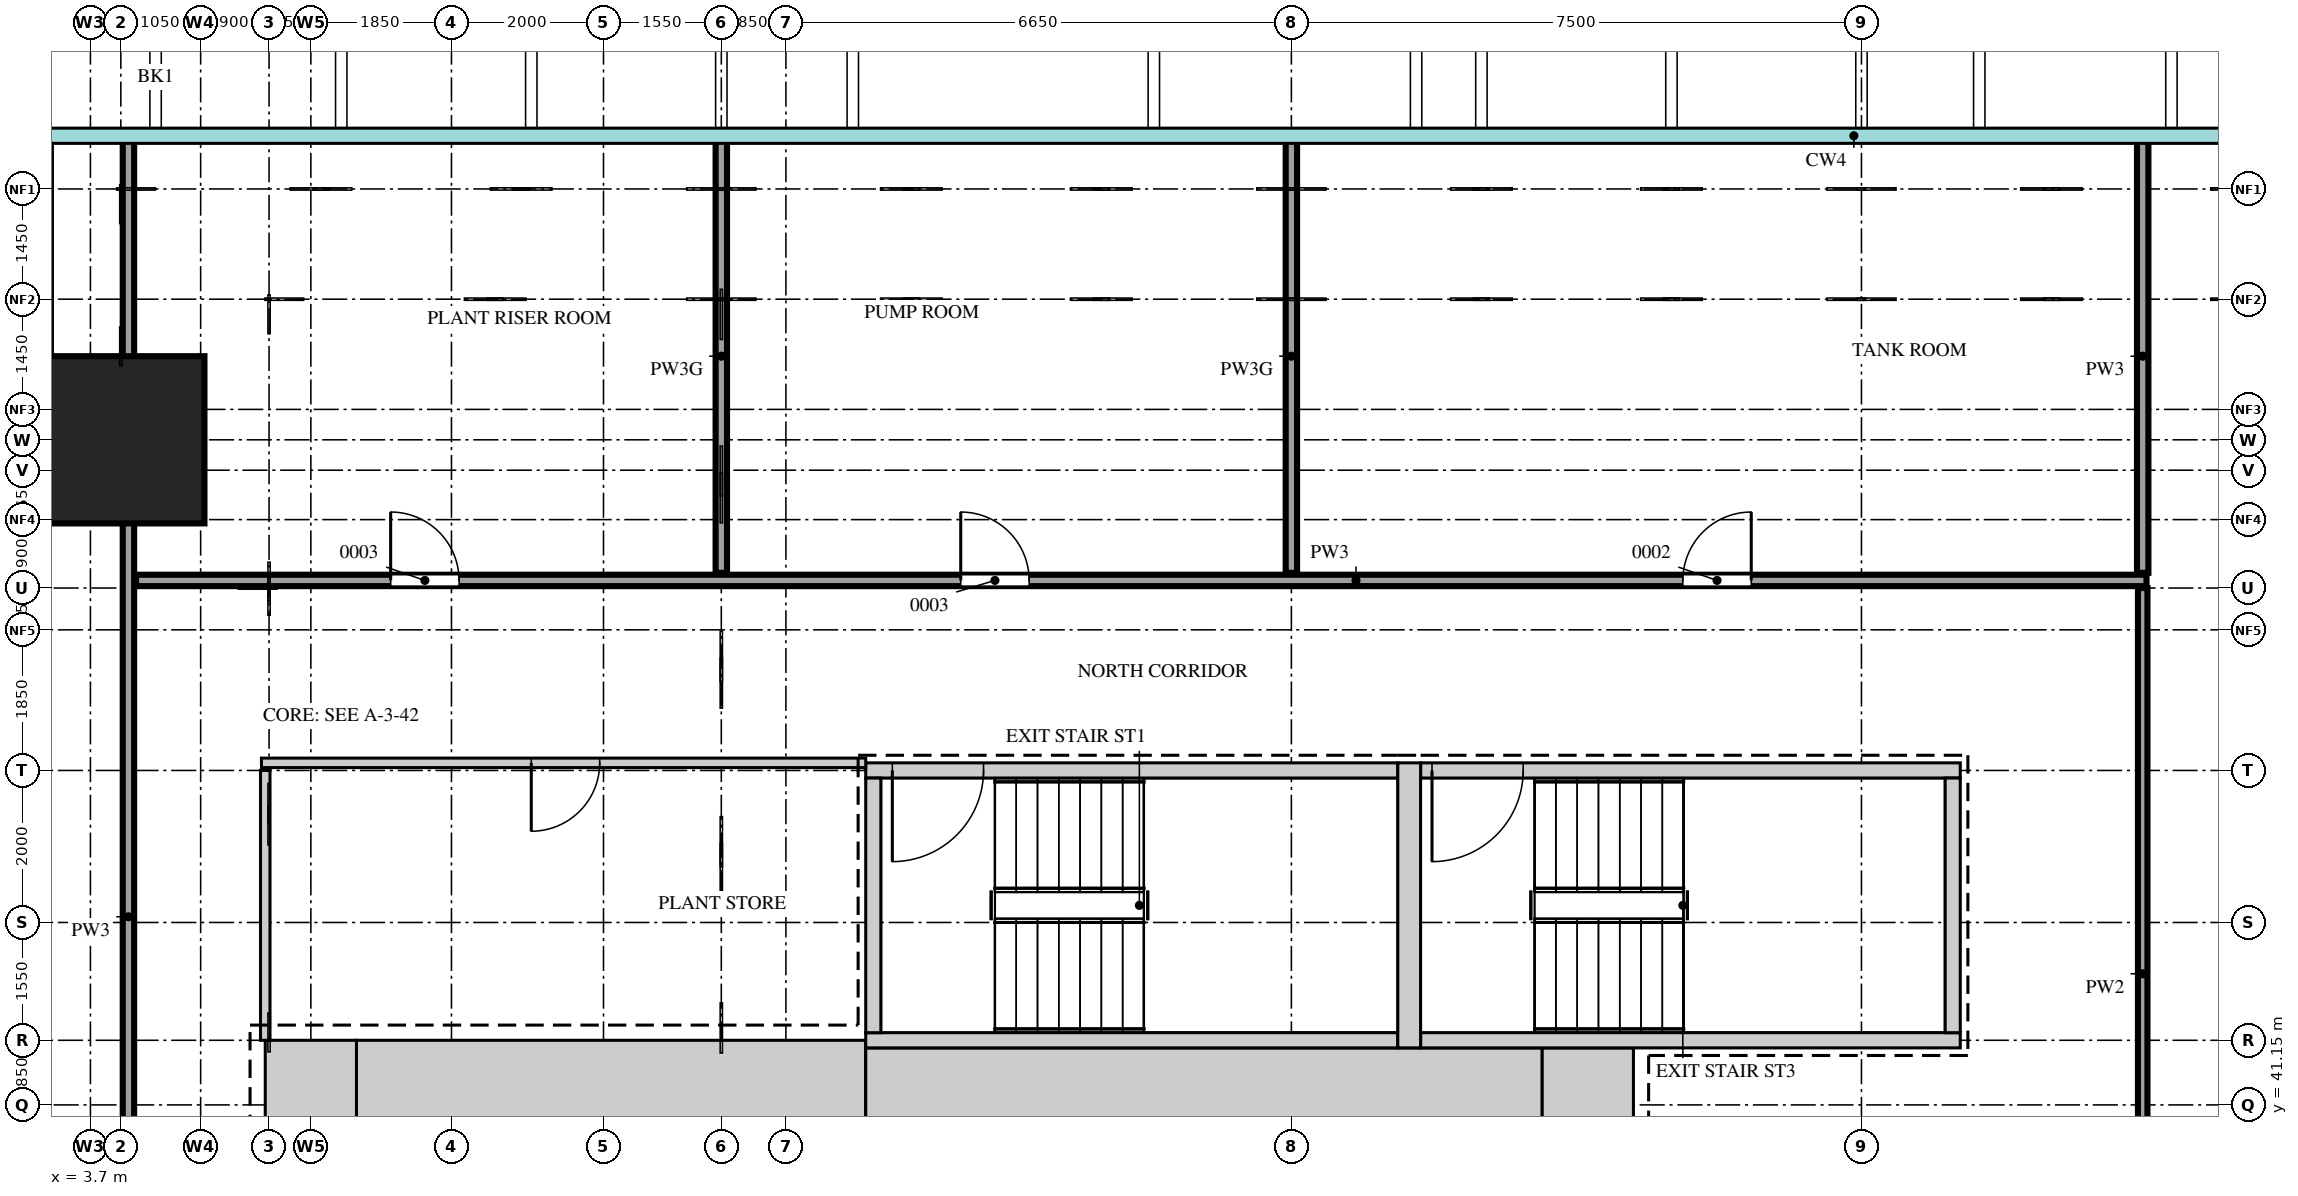
"""IFC4 building model, lengths in metres.
Left out: names, types, materials, properties, quantities, classifications, styles, units other than length and angle.
Written with IfcOpenShell. Run it as: python <this file> out.ifc"""

import sys

from ifc_helpers import new_model, si_unit, direction, frame, frame_2d, origin, origin_2d, place, context, subcontext, project, spatial, rectangle, extrude, source, transform, mapped, element, fill, save


model = new_model("IFC4")
c1 = context("Model", 3, precision=1e-05, world=origin(), true_north=direction((0.0, 1.0)))
c2 = subcontext(c1, "Body", "Model", "MODEL_VIEW")
j1 = project(units=[si_unit("LENGTHUNIT", "METRE"), si_unit("PLANEANGLEUNIT", "RADIAN")], contexts=[c1])
p1 = place(None, origin())
s1 = spatial("IfcSite", under=j1, at=p1, CompositionType="ELEMENT")
p2 = place(p1, origin())
s2 = spatial("IfcBuilding", under=s1, at=p2, CompositionType="ELEMENT")
p3 = place(p2, frame((0.0, 0.0, 96.0)))
s3 = spatial("IfcBuildingStorey", under=s2, at=p3, CompositionType="ELEMENT", Elevation=96.0)
m1 = source(origin(), c2, "Body", "SweptSolid", [
    extrude(rectangle(XDim=6.7, YDim=1.2, at=frame_2d((3.35, 0.0))), origin(), (0.0, 0.0, 1.0), 5.2),
])
p4 = place(p3, frame((7.2, 41.4, 0.0), z_axis=(0.0, 0.0, 1.0), x_axis=(1.0, 0.0, 0.0)))
e1 = element("IfcWall", 1, at=p4, inside=s3, PredefinedType="SHEAR", context=c2, shape_type="MappedRepresentation", body=[
    mapped(m1, transform((0.0, 0.0, 0.0))),
])
m2 = source(origin(), c2, "Body", "SweptSolid", [
    extrude(rectangle(XDim=8.9, YDim=1.1, at=frame_2d((4.45, 0.0))), origin(), (0.0, 0.0, 1.0), 5.2),
])
p5 = place(p3, frame((13.9, 41.35, 0.0), z_axis=(0.0, 0.0, 1.0), x_axis=(1.0, 0.0, 0.0)))
e2 = element("IfcWall", 2, at=p5, inside=s3, PredefinedType="SHEAR", context=c2, shape_type="MappedRepresentation", body=[
    mapped(m2, transform((0.0, 0.0, 0.0))),
])
m3 = source(origin(), c2, "Body", "SweptSolid", [
    extrude(rectangle(XDim=1.2, YDim=1.1, at=frame_2d((0.6, 0.0))), origin(), (0.0, 0.0, 1.0), 5.2),
])
p6 = place(p3, frame((22.8, 41.35, 0.0), z_axis=(0.0, 0.0, 1.0), x_axis=(1.0, 0.0, 0.0)))
e3 = element("IfcWall", 3, at=p6, inside=s3, PredefinedType="SHEAR", context=c2, shape_type="MappedRepresentation", body=[
    mapped(m3, transform((0.0, 0.0, 0.0))),
])
m4 = source(origin(), c2, "Body", "SweptSolid", [
    extrude(rectangle(XDim=1.2, YDim=1.2, at=frame_2d((0.6, 0.0))), origin(), (0.0, 0.0, 1.0), 5.2),
])
p7 = place(p3, frame((6.0, 41.4, 0.0), z_axis=(0.0, 0.0, 1.0), x_axis=(1.0, 0.0, 0.0)))
e4 = element("IfcWall", 4, at=p7, inside=s3, PredefinedType="SHEAR", context=c2, shape_type="MappedRepresentation", body=[
    mapped(m4, transform((0.0, 0.0, 0.0))),
])
m5 = source(origin(), c2, "Body", "SweptSolid", [
    extrude(rectangle(XDim=7.0, YDim=0.2, at=frame_2d((3.5, 0.0))), origin(), (0.0, 0.0, 1.0), 5.2),
])
p8 = place(p3, frame((13.9, 45.55, 0.0), z_axis=(0.0, 0.0, 1.0), x_axis=(1.0, 0.0, 0.0)))
e5 = element("IfcWall", 5, at=p8, inside=s3, PredefinedType="SHEAR", context=c2, shape_type="MappedRepresentation", body=[
    mapped(m5, transform((0.0, 0.0, 0.0))),
])
m6 = source(origin(), c2, "Body", "SweptSolid", [
    extrude(rectangle(XDim=1.2, YDim=2.1, at=frame_2d((0.6, 1.05))), frame((0.0, 0.11, 0.0), z_axis=(0.0, -1.0, 0.0), x_axis=(1.0, 0.0, 0.0)), (0.0, 0.0, 1.0), 0.22),
])
p9 = place(p8, frame((0.35, 0.0, 0.0)))
e6 = element("IfcOpeningElement", 6, at=p9, cuts=e5, PredefinedType="OPENING", context=c2, shape_type="MappedRepresentation", body=[
    mapped(m6, transform((0.0, 0.0, 0.0))),
])
p10 = place(p3, frame((13.9, 42.0, 0.0), z_axis=(0.0, 0.0, 1.0), x_axis=(1.0, 0.0, 0.0)))
e7 = element("IfcWall", 7, at=p10, inside=s3, PredefinedType="SHEAR", context=c2, shape_type="MappedRepresentation", body=[
    mapped(m5, transform((0.0, 0.0, 0.0))),
])
m7 = source(origin(), c2, "Body", "SweptSolid", [
    extrude(rectangle(XDim=7.1, YDim=0.2, at=frame_2d((3.55, 0.0))), origin(), (0.0, 0.0, 1.0), 5.2),
])
p11 = place(p3, frame((21.2, 45.55, 0.0), z_axis=(0.0, 0.0, 1.0), x_axis=(1.0, 0.0, 0.0)))
e8 = element("IfcWall", 8, at=p11, inside=s3, PredefinedType="SHEAR", context=c2, shape_type="MappedRepresentation", body=[
    mapped(m7, transform((0.0, 0.0, 0.0))),
])
p12 = place(p11, frame((0.15, 0.0, 0.0)))
e9 = element("IfcOpeningElement", 9, at=p12, cuts=e8, PredefinedType="OPENING", context=c2, shape_type="MappedRepresentation", body=[
    mapped(m6, transform((0.0, 0.0, 0.0))),
])
p13 = place(p3, frame((21.2, 42.0, 0.0), z_axis=(0.0, 0.0, 1.0), x_axis=(1.0, 0.0, 0.0)))
e10 = element("IfcWall", 10, at=p13, inside=s3, PredefinedType="SHEAR", context=c2, shape_type="MappedRepresentation", body=[
    mapped(m7, transform((0.0, 0.0, 0.0))),
])
m8 = source(origin(), c2, "Body", "SweptSolid", [
    extrude(rectangle(XDim=3.75, YDim=0.3, at=frame_2d((1.875, 0.0))), origin(), (0.0, 0.0, 1.0), 5.2),
])
p14 = place(p3, frame((21.05, 41.9, 0.0), z_axis=(0.0, 0.0, 1.0), x_axis=(0.0, 1.0, 0.0)))
e11 = element("IfcWall", 11, at=p14, inside=s3, PredefinedType="SHEAR", context=c2, shape_type="MappedRepresentation", body=[
    mapped(m8, transform((0.0, 0.0, 0.0))),
])
m9 = source(origin(), c2, "Body", "SweptSolid", [
    extrude(rectangle(XDim=3.35, YDim=0.2, at=frame_2d((1.675, 0.0))), origin(), (0.0, 0.0, 1.0), 5.2),
])
for number, where, z_axis, x_axis in (
    (12, (14.0, 42.1, 0.0), (0.0, 0.0, 1.0), (0.0, 1.0, 0.0)),
    (13, (28.2, 42.1, 0.0), (0.0, 0.0, 1.0), (0.0, 1.0, 0.0)),
):
    element("IfcWall", number, at=place(p3, frame(where, z_axis=z_axis, x_axis=x_axis)), inside=s3, PredefinedType="SHEAR", context=c2, shape_type="MappedRepresentation", body=[
        mapped(m9, transform((0.0, 0.0, 0.0))),
    ])
m10 = source(origin(), c2, "Body", "SweptSolid", [
    extrude(rectangle(XDim=2.2, YDim=2.2, at=origin_2d()), origin(), (0.0, 0.0, 1.0), 5.5),
])
p15 = place(p3, frame((4.1, 49.9, 0.0), z_axis=(0.0, 0.0, 1.0), x_axis=(1.0, 0.0, 0.0)))
e14 = element("IfcColumn", 14, at=p15, inside=s3, PredefinedType="COLUMN", context=c2, shape_type="MappedRepresentation", body=[
    mapped(m10, transform((0.0, 0.0, 0.0))),
])
m11 = source(origin(), c2, "Body", "SweptSolid", [
    extrude(rectangle(XDim=53.7, YDim=0.15, at=frame_2d((26.85, 0.0))), origin(), (0.0, 0.0, 1.0), 5.2),
])
p16 = place(p3, frame((4.2, 0.15, 0.0), z_axis=(0.0, 0.0, 1.0), x_axis=(0.0, 1.0, 0.0)))
e15 = element("IfcWall", 15, at=p16, inside=s3, PredefinedType="PARTITIONING", context=c2, shape_type="MappedRepresentation", body=[
    mapped(m11, transform((0.0, 0.0, 0.0))),
])
m12 = source(origin(), c2, "Body", "SweptSolid", [
    extrude(rectangle(XDim=0.9, YDim=2.1, at=frame_2d((0.45, 1.05))), frame((0.0, 0.085, 0.0), z_axis=(0.0, -1.0, 0.0), x_axis=(1.0, 0.0, 0.0)), (0.0, 0.0, 1.0), 0.17),
])
p17 = place(p16, frame((13.45, 0.0, 0.0)))
e16 = element("IfcOpeningElement", 16, at=p17, cuts=e15, PredefinedType="OPENING", context=c2, shape_type="MappedRepresentation", body=[
    mapped(m12, transform((0.0, 0.0, 0.0))),
])
m13 = source(origin(), c2, "Body", "SweptSolid", [
    extrude(rectangle(XDim=1.2, YDim=2.1, at=frame_2d((0.6, 1.05))), frame((0.0, 0.085, 0.0), z_axis=(0.0, -1.0, 0.0), x_axis=(1.0, 0.0, 0.0)), (0.0, 0.0, 1.0), 0.17),
])
p18 = place(p16, frame((32.05, 0.0, 0.0)))
e17 = element("IfcOpeningElement", 17, at=p18, cuts=e15, PredefinedType="OPENING", context=c2, shape_type="MappedRepresentation", body=[
    mapped(m13, transform((0.0, 0.0, 0.0))),
])
m14 = source(origin(), c2, "Body", "SweptSolid", [
    extrude(rectangle(XDim=10.15, YDim=0.125, at=frame_2d((5.075, 0.0))), origin(), (0.0, 0.0, 1.0), 5.2),
])
p19 = place(p3, frame((30.7, 37.8, 0.0), z_axis=(0.0, 0.0, 1.0), x_axis=(0.0, 1.0, 0.0)))
e18 = element("IfcWall", 18, at=p19, inside=s3, PredefinedType="PARTITIONING", context=c2, shape_type="MappedRepresentation", body=[
    mapped(m14, transform((0.0, 0.0, 0.0))),
])
m15 = source(origin(), c2, "Body", "SweptSolid", [
    extrude(rectangle(XDim=3.55, YDim=0.125, at=frame_2d((1.775, 0.0))), origin(), (0.0, 0.0, 1.0), 5.2),
])
p20 = place(p3, frame((6.0, 42.0, 0.0), z_axis=(0.0, 0.0, 1.0), x_axis=(0.0, 1.0, 0.0)))
e19 = element("IfcWall", 19, at=p20, inside=s3, PredefinedType="PARTITIONING", context=c2, shape_type="MappedRepresentation", body=[
    mapped(m15, transform((0.0, 0.0, 0.0))),
])
m16 = source(origin(), c2, "Body", "SweptSolid", [
    extrude(rectangle(XDim=7.95, YDim=0.125, at=frame_2d((3.975, 0.0))), origin(), (0.0, 0.0, 1.0), 5.2),
])
p21 = place(p3, frame((5.95, 45.65, 0.0), z_axis=(0.0, 0.0, 1.0), x_axis=(1.0, 0.0, 0.0)))
e20 = element("IfcWall", 20, at=p21, inside=s3, PredefinedType="PARTITIONING", context=c2, shape_type="MappedRepresentation", body=[
    mapped(m16, transform((0.0, 0.0, 0.0))),
])
m17 = source(origin(), c2, "Body", "SweptSolid", [
    extrude(rectangle(XDim=0.9, YDim=2.1, at=frame_2d((0.45, 1.05))), frame((0.0, 0.073, 0.0), z_axis=(0.0, -1.0, 0.0), x_axis=(1.0, 0.0, 0.0)), (0.0, 0.0, 1.0), 0.145),
])
p22 = place(p21, frame((3.55, 0.0, 0.0)))
e21 = element("IfcOpeningElement", 21, at=p22, cuts=e20, PredefinedType="OPENING", context=c2, shape_type="MappedRepresentation", body=[
    mapped(m17, transform((0.0, 0.0, 0.0))),
])
m18 = source(origin(), c2, "Body", "SweptSolid", [
    extrude(rectangle(XDim=26.45, YDim=0.15, at=frame_2d((13.225, 0.0))), origin(), (0.0, 0.0, 1.0), 5.2),
])
p23 = place(p3, frame((4.3, 48.05, 0.0), z_axis=(0.0, 0.0, 1.0), x_axis=(1.0, 0.0, 0.0)))
e22 = element("IfcWall", 22, at=p23, inside=s3, PredefinedType="PARTITIONING", context=c2, shape_type="MappedRepresentation", body=[
    mapped(m18, transform((0.0, 0.0, 0.0))),
])
p24 = place(p23, frame((3.35, 0.0, 0.0)))
e23 = element("IfcOpeningElement", 23, at=p24, cuts=e22, PredefinedType="OPENING", context=c2, shape_type="MappedRepresentation", body=[
    mapped(m12, transform((0.0, 0.0, 0.0))),
])
p25 = place(p23, frame((10.85, 0.0, 0.0)))
e24 = element("IfcOpeningElement", 24, at=p25, cuts=e22, PredefinedType="OPENING", context=c2, shape_type="MappedRepresentation", body=[
    mapped(m12, transform((0.0, 0.0, 0.0))),
])
p26 = place(p23, frame((20.35, 0.0, 0.0)))
e25 = element("IfcOpeningElement", 25, at=p26, cuts=e22, PredefinedType="OPENING", context=c2, shape_type="MappedRepresentation", body=[
    mapped(m12, transform((0.0, 0.0, 0.0))),
])
m19 = source(origin(), c2, "Body", "SweptSolid", [
    extrude(rectangle(XDim=5.7, YDim=0.15, at=frame_2d((2.85, 0.0))), origin(), (0.0, 0.0, 1.0), 2.35),
])
for number, where, z_axis, x_axis in (
    (26, (12.0, 48.15, 0.0), (0.0, 0.0, 1.0), (0.0, 1.0, 0.0)),
    (27, (19.5, 48.15, 0.0), (0.0, 0.0, 1.0), (0.0, 1.0, 0.0)),
):
    element("IfcWall", number, at=place(p3, frame(where, z_axis=z_axis, x_axis=x_axis)), inside=s3, PredefinedType="PARTITIONING", context=c2, shape_type="MappedRepresentation", body=[
        mapped(m19, transform((0.0, 0.0, 0.0))),
    ])
m20 = source(origin(), c2, "Body", "SweptSolid", [
    extrude(rectangle(XDim=5.7, YDim=0.15, at=frame_2d((2.85, 0.0))), origin(), (0.0, 0.0, 1.0), 5.2),
])
p27 = place(p3, frame((30.7, 48.15, 0.0), z_axis=(0.0, 0.0, 1.0), x_axis=(0.0, 1.0, 0.0)))
e28 = element("IfcWall", 28, at=p27, inside=s3, PredefinedType="PARTITIONING", context=c2, shape_type="MappedRepresentation", body=[
    mapped(m20, transform((0.0, 0.0, 0.0))),
])
m21 = source(origin(), c2, "Body", "SweptSolid", [
    extrude(rectangle(XDim=0.9, YDim=2.1, at=frame_2d((0.45, 1.05))), frame((0.0, 0.025, 0.0), z_axis=(0.0, -1.0, 0.0), x_axis=(1.0, 0.0, 0.0)), (0.0, 0.0, 1.0), 0.05),
])
p28 = place(p24, origin())
e29 = element("IfcDoor", 29, at=p28, inside=s3, OperationType="SINGLE_SWING_RIGHT", PredefinedType="DOOR", context=c2, shape_type="MappedRepresentation", body=[
    mapped(m21, transform((0.0, 0.0, 0.0))),
])
fill(e23, e29)
p29 = place(p25, origin())
e30 = element("IfcDoor", 30, at=p29, inside=s3, OperationType="SINGLE_SWING_RIGHT", PredefinedType="DOOR", context=c2, shape_type="MappedRepresentation", body=[
    mapped(m21, transform((0.0, 0.0, 0.0))),
])
fill(e24, e30)
p30 = place(p26, origin())
e31 = element("IfcDoor", 31, at=p30, inside=s3, OperationType="SINGLE_SWING_LEFT", PredefinedType="DOOR", context=c2, shape_type="MappedRepresentation", body=[
    mapped(m21, transform((0.0, 0.0, 0.0))),
])
fill(e25, e31)
p31 = place(p22, origin())
e32 = element("IfcDoor", 32, at=p31, inside=s3, OperationType="SINGLE_SWING_LEFT", PredefinedType="DOOR", context=c2, shape_type="MappedRepresentation", body=[
    mapped(m21, transform((0.0, 0.0, 0.0))),
])
fill(e21, e32)
m22 = source(origin(), c2, "Body", "SweptSolid", [
    extrude(rectangle(XDim=1.2, YDim=2.1, at=frame_2d((0.6, 1.05))), frame((0.0, 0.025, 0.0), z_axis=(0.0, -1.0, 0.0), x_axis=(1.0, 0.0, 0.0)), (0.0, 0.0, 1.0), 0.05),
])
p32 = place(p9, origin())
e33 = element("IfcDoor", 33, at=p32, inside=s3, OperationType="SINGLE_SWING_LEFT", PredefinedType="DOOR", context=c2, shape_type="MappedRepresentation", body=[
    mapped(m22, transform((0.0, 0.0, 0.0))),
])
fill(e6, e33)
p33 = place(p12, origin())
e34 = element("IfcDoor", 34, at=p33, inside=s3, OperationType="SINGLE_SWING_LEFT", PredefinedType="DOOR", context=c2, shape_type="MappedRepresentation", body=[
    mapped(m22, transform((0.0, 0.0, 0.0))),
])
fill(e9, e34)
save(model, sys.argv[1])
